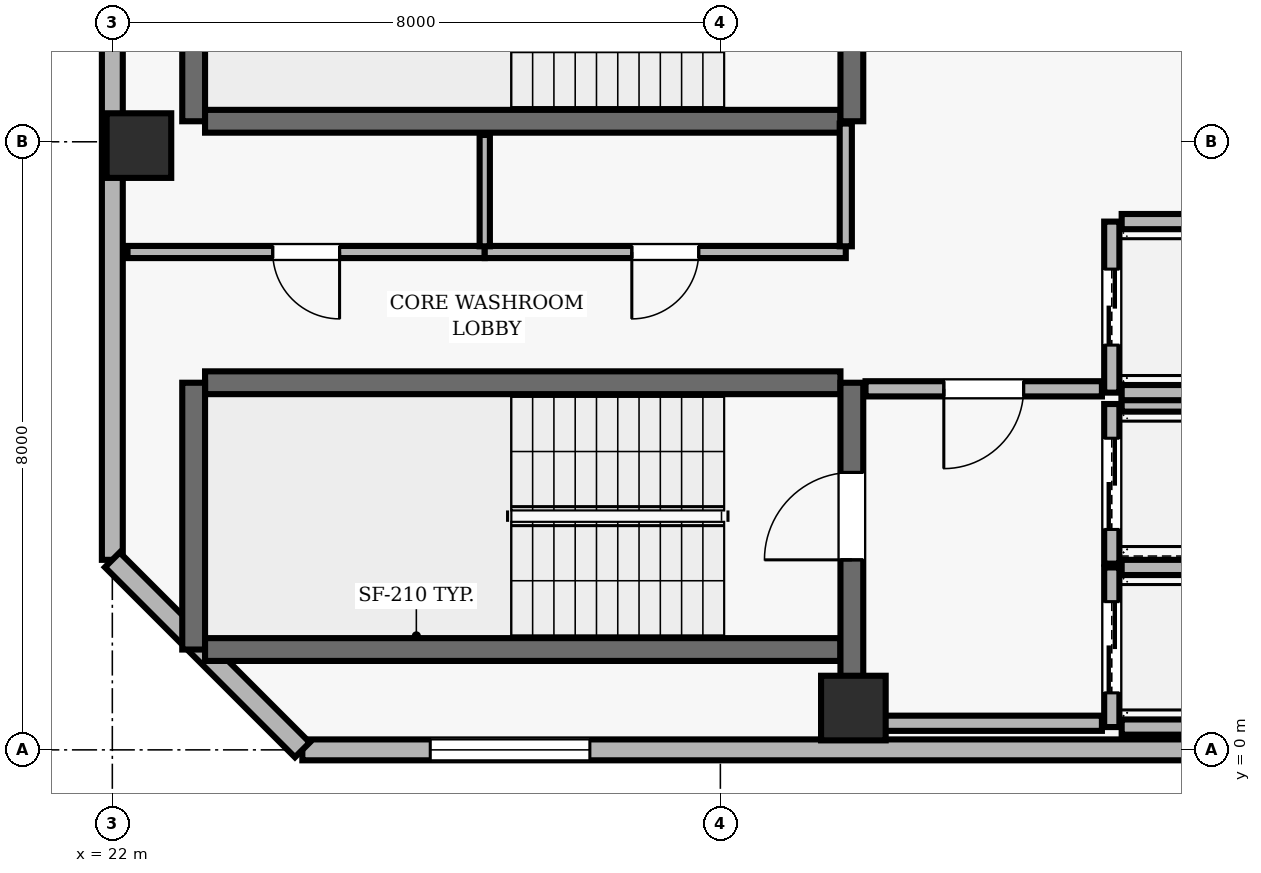
"""IFC4 building model, lengths in metres.
Left out: names, types, materials, properties, quantities, classifications, styles, units other than length and angle.
Written with IfcOpenShell. Run it as: python <this file> out.ifc"""

import sys

from ifc_helpers import new_model, si_unit, direction, frame, frame_2d, origin, origin_2d, place, context, subcontext, project, spatial, rectangle, extrude, element, fill, save


model = new_model("IFC4")
c1 = context("Model", 3, precision=1e-05, world=origin(), true_north=direction((0.0, 1.0)))
c2 = subcontext(c1, "Body", "Model", "MODEL_VIEW")
j1 = project(units=[si_unit("LENGTHUNIT", "METRE"), si_unit("PLANEANGLEUNIT", "RADIAN")], contexts=[c1])
p1 = place(None, origin())
s1 = spatial("IfcSite", under=j1, at=p1, CompositionType="ELEMENT")
p2 = place(p1, origin())
s2 = spatial("IfcBuilding", under=s1, at=p2, CompositionType="ELEMENT")
p3 = place(p2, frame((0.0, 0.0, 259.9)))
s3 = spatial("IfcBuildingStorey", under=s2, at=p3, CompositionType="ELEMENT", Elevation=259.9)
for number, where, z_axis, x_axis in (
    (1, (31.75, 0.55, 0.0), (0.0, 0.0, 1.0), (1.0, 0.0, 0.0)),
    (2, (22.35, 7.95, 0.0), (0.0, 0.0, 1.0), (1.0, 0.0, 0.0)),
):
    element("IfcColumn", number, at=place(p3, frame(where, z_axis=z_axis, x_axis=x_axis)), inside=s3, PredefinedType="COLUMN", context=c2, shape_type="SweptSolid", body=[
        extrude(rectangle(XDim=0.85, YDim=0.85, at=origin_2d()), origin(), (0.0, 0.0, 1.0), 3.9),
    ])
p4 = place(p3, frame((24.5, 0.0, 0.0), z_axis=(0.0, 0.0, 1.0), x_axis=(1.0, 0.0, 0.0)))
e3 = element("IfcWall", 3, at=p4, inside=s3, PredefinedType="SOLIDWALL", context=c2, shape_type="SweptSolid", body=[
    extrude(rectangle(XDim=32.8, YDim=0.275, at=frame_2d((16.4, 0.0))), origin(), (0.0, 0.0, 1.0), 3.69),
])
p5 = place(p4, frame((1.683, 0.0, 0.9)))
e4 = element("IfcOpeningElement", 4, at=p5, cuts=e3, PredefinedType="OPENING", context=c2, shape_type="SweptSolid", body=[
    extrude(rectangle(XDim=2.1, YDim=1.6, at=frame_2d((1.05, 0.8))), frame((0.0, 0.147, 0.0), z_axis=(0.0, -1.0, 0.0), x_axis=(1.0, 0.0, 0.0)), (0.0, 0.0, 1.0), 0.295),
])
p6 = place(p4, frame((23.55, 0.0, 0.9)))
e5 = element("IfcOpeningElement", 5, at=p6, cuts=e3, PredefinedType="OPENING", context=c2, shape_type="SweptSolid", body=[
    extrude(rectangle(XDim=2.1, YDim=1.6, at=frame_2d((1.05, 0.8))), frame((0.0, 0.147, 0.0), z_axis=(0.0, -1.0, 0.0), x_axis=(1.0, 0.0, 0.0)), (0.0, 0.0, 1.0), 0.295),
])
p7 = place(p4, frame((29.017, 0.0, 0.9)))
e6 = element("IfcOpeningElement", 6, at=p7, cuts=e3, PredefinedType="OPENING", context=c2, shape_type="SweptSolid", body=[
    extrude(rectangle(XDim=2.1, YDim=1.6, at=frame_2d((1.05, 0.8))), frame((0.0, 0.147, 0.0), z_axis=(0.0, -1.0, 0.0), x_axis=(1.0, 0.0, 0.0)), (0.0, 0.0, 1.0), 0.295),
])
p8 = place(p3, frame((22.0, 35.3, 0.0), z_axis=(0.0, 0.0, 1.0), x_axis=(0.0, -1.0, 0.0)))
e7 = element("IfcWall", 7, at=p8, inside=s3, PredefinedType="SOLIDWALL", context=c2, shape_type="SweptSolid", body=[
    extrude(rectangle(XDim=32.8, YDim=0.275, at=frame_2d((16.4, 0.0))), origin(), (0.0, 0.0, 1.0), 3.69),
])
p9 = place(p8, frame((7.3, 0.0, 0.0)))
e8 = element("IfcOpeningElement", 8, at=p9, cuts=e7, PredefinedType="OPENING", context=c2, shape_type="SweptSolid", body=[
    extrude(rectangle(XDim=1.0, YDim=2.2, at=frame_2d((0.5, 1.1))), frame((0.0, 0.147, 0.0), z_axis=(0.0, -1.0, 0.0), x_axis=(1.0, 0.0, 0.0)), (0.0, 0.0, 1.0), 0.295),
])
p10 = place(p8, frame((12.617, 0.0, 0.9)))
e9 = element("IfcOpeningElement", 9, at=p10, cuts=e7, PredefinedType="OPENING", context=c2, shape_type="SweptSolid", body=[
    extrude(rectangle(XDim=2.1, YDim=1.6, at=frame_2d((1.05, 0.8))), frame((0.0, 0.147, 0.0), z_axis=(0.0, -1.0, 0.0), x_axis=(1.0, 0.0, 0.0)), (0.0, 0.0, 1.0), 0.295),
])
p11 = place(p8, frame((17.633, 0.0, 0.9)))
e10 = element("IfcOpeningElement", 10, at=p11, cuts=e7, PredefinedType="OPENING", context=c2, shape_type="SweptSolid", body=[
    extrude(rectangle(XDim=2.1, YDim=1.6, at=frame_2d((1.05, 0.8))), frame((0.0, 0.147, 0.0), z_axis=(0.0, -1.0, 0.0), x_axis=(1.0, 0.0, 0.0)), (0.0, 0.0, 1.0), 0.295),
])
p12 = place(p8, frame((23.55, 0.0, 0.9)))
e11 = element("IfcOpeningElement", 11, at=p12, cuts=e7, PredefinedType="OPENING", context=c2, shape_type="SweptSolid", body=[
    extrude(rectangle(XDim=2.1, YDim=1.6, at=frame_2d((1.05, 0.8))), frame((0.0, 0.147, 0.0), z_axis=(0.0, -1.0, 0.0), x_axis=(1.0, 0.0, 0.0)), (0.0, 0.0, 1.0), 0.295),
])
p13 = place(p3, frame((22.0, 2.5, 0.0), z_axis=(0.0, 0.0, 1.0), x_axis=(0.707106781187, -0.707106781187, 0.0)))
e12 = element("IfcWall", 12, at=p13, inside=s3, PredefinedType="SOLIDWALL", context=c2, shape_type="SweptSolid", body=[
    extrude(rectangle(XDim=3.536, YDim=0.275, at=frame_2d((1.768, 0.0))), origin(), (0.0, 0.0, 1.0), 3.69),
])
p14 = place(p3, frame((31.58, 4.83, 0.0), z_axis=(0.0, 0.0, 1.0), x_axis=(-1.0, 0.0, 0.0)))
e13 = element("IfcWall", 13, at=p14, inside=s3, PredefinedType="SHEAR", context=c2, shape_type="SweptSolid", body=[
    extrude(rectangle(XDim=8.36, YDim=0.3, at=frame_2d((4.18, 0.0))), origin(), (0.0, 0.0, 1.0), 3.69),
])
p15 = place(p3, frame((23.07, 4.83, 0.0), z_axis=(0.0, 0.0, 1.0), x_axis=(0.0, -1.0, 0.0)))
e14 = element("IfcWall", 14, at=p15, inside=s3, PredefinedType="SHEAR", context=c2, shape_type="SweptSolid", body=[
    extrude(rectangle(XDim=3.51, YDim=0.3, at=frame_2d((1.755, 0.0))), origin(), (0.0, 0.0, 1.0), 3.69),
])
p16 = place(p3, frame((23.22, 1.32, 0.0), z_axis=(0.0, 0.0, 1.0), x_axis=(1.0, 0.0, 0.0)))
e15 = element("IfcWall", 15, at=p16, inside=s3, PredefinedType="SHEAR", context=c2, shape_type="SweptSolid", body=[
    extrude(rectangle(XDim=8.36, YDim=0.3, at=frame_2d((4.18, 0.0))), origin(), (0.0, 0.0, 1.0), 3.69),
])
p17 = place(p3, frame((31.73, 0.96, 0.0), z_axis=(0.0, 0.0, 1.0), x_axis=(0.0, 1.0, 0.0)))
e16 = element("IfcWall", 16, at=p17, inside=s3, PredefinedType="SHEAR", context=c2, shape_type="SweptSolid", body=[
    extrude(rectangle(XDim=3.87, YDim=0.3, at=frame_2d((1.935, 0.0))), origin(), (0.0, 0.0, 1.0), 3.69),
])
p18 = place(p17, frame((1.54, 0.0, 0.0)))
e17 = element("IfcOpeningElement", 17, at=p18, cuts=e16, PredefinedType="OPENING", context=c2, shape_type="SweptSolid", body=[
    extrude(rectangle(XDim=1.15, YDim=2.15, at=frame_2d((0.575, 1.075))), frame((0.0, 0.16, 0.0), z_axis=(0.0, -1.0, 0.0), x_axis=(1.0, 0.0, 0.0)), (0.0, 0.0, 1.0), 0.32),
])
p19 = place(p3, frame((23.07, 11.78, 0.0), z_axis=(0.0, 0.0, 1.0), x_axis=(0.0, -1.0, 0.0)))
e18 = element("IfcWall", 18, at=p19, inside=s3, PredefinedType="SHEAR", context=c2, shape_type="SweptSolid", body=[
    extrude(rectangle(XDim=3.51, YDim=0.3, at=frame_2d((1.755, 0.0))), origin(), (0.0, 0.0, 1.0), 3.69),
])
p20 = place(p3, frame((23.22, 8.27, 0.0), z_axis=(0.0, 0.0, 1.0), x_axis=(1.0, 0.0, 0.0)))
e19 = element("IfcWall", 19, at=p20, inside=s3, PredefinedType="SHEAR", context=c2, shape_type="SweptSolid", body=[
    extrude(rectangle(XDim=8.36, YDim=0.3, at=frame_2d((4.18, 0.0))), origin(), (0.0, 0.0, 1.0), 3.69),
])
p21 = place(p3, frame((31.73, 8.27, 0.0), z_axis=(0.0, 0.0, 1.0), x_axis=(0.0, 1.0, 0.0)))
e20 = element("IfcWall", 20, at=p21, inside=s3, PredefinedType="SHEAR", context=c2, shape_type="SweptSolid", body=[
    extrude(rectangle(XDim=3.51, YDim=0.3, at=frame_2d((1.755, 0.0))), origin(), (0.0, 0.0, 1.0), 3.69),
])
p22 = place(p21, frame((1.18, 0.0, 0.0)))
e21 = element("IfcOpeningElement", 21, at=p22, cuts=e20, PredefinedType="OPENING", context=c2, shape_type="SweptSolid", body=[
    extrude(rectangle(XDim=1.15, YDim=2.15, at=frame_2d((0.575, 1.075))), frame((0.0, 0.16, 0.0), z_axis=(0.0, -1.0, 0.0), x_axis=(1.0, 0.0, 0.0)), (0.0, 0.0, 1.0), 0.32),
])
p23 = place(p3, frame((35.15, 2.4, 0.0), z_axis=(0.0, 0.0, 1.0), x_axis=(0.0, -1.0, 0.0)))
e22 = element("IfcWall", 22, at=p23, inside=s3, PredefinedType="SOLIDWALL", context=c2, shape_type="SweptSolid", body=[
    extrude(rectangle(XDim=2.1, YDim=0.2, at=frame_2d((1.05, 0.0))), origin(), (0.0, 0.0, 1.0), 3.69),
])
p24 = place(p23, frame((0.45, 0.0, 0.0)))
e23 = element("IfcOpeningElement", 23, at=p24, cuts=e22, PredefinedType="OPENING", context=c2, shape_type="SweptSolid", body=[
    extrude(rectangle(XDim=1.2, YDim=2.15, at=frame_2d((0.6, 1.075))), frame((0.0, 0.11, 0.0), z_axis=(0.0, -1.0, 0.0), x_axis=(1.0, 0.0, 0.0)), (0.0, 0.0, 1.0), 0.22),
])
for number, where, z_axis, x_axis in (
    (24, (35.28, 0.3, 0.0), (0.0, 0.0, 1.0), (1.0, 0.0, 0.0)),
    (25, (37.42, 2.4, 0.0), (0.0, 0.0, 1.0), (-1.0, 0.0, 0.0)),
):
    element("IfcWall", number, at=place(p3, frame(where, z_axis=z_axis, x_axis=x_axis)), inside=s3, PredefinedType="SOLIDWALL", context=c2, shape_type="SweptSolid", body=[
        extrude(rectangle(XDim=2.14, YDim=0.2, at=frame_2d((1.07, 0.0))), origin(), (0.0, 0.0, 1.0), 3.69),
    ])
p25 = place(p3, frame((35.15, 4.55, 0.0), z_axis=(0.0, 0.0, 1.0), x_axis=(0.0, -1.0, 0.0)))
e26 = element("IfcWall", 26, at=p25, inside=s3, PredefinedType="SOLIDWALL", context=c2, shape_type="SweptSolid", body=[
    extrude(rectangle(XDim=2.1, YDim=0.2, at=frame_2d((1.05, 0.0))), origin(), (0.0, 0.0, 1.0), 3.69),
])
p26 = place(p25, frame((0.45, 0.0, 0.0)))
e27 = element("IfcOpeningElement", 27, at=p26, cuts=e26, PredefinedType="OPENING", context=c2, shape_type="SweptSolid", body=[
    extrude(rectangle(XDim=1.2, YDim=2.15, at=frame_2d((0.6, 1.075))), frame((0.0, 0.11, 0.0), z_axis=(0.0, -1.0, 0.0), x_axis=(1.0, 0.0, 0.0)), (0.0, 0.0, 1.0), 0.22),
])
p27 = place(p3, frame((37.42, 4.55, 0.0), z_axis=(0.0, 0.0, 1.0), x_axis=(-1.0, 0.0, 0.0)))
e28 = element("IfcWall", 28, at=p27, inside=s3, PredefinedType="SOLIDWALL", context=c2, shape_type="SweptSolid", body=[
    extrude(rectangle(XDim=2.14, YDim=0.2, at=frame_2d((1.07, 0.0))), origin(), (0.0, 0.0, 1.0), 3.69),
])
p28 = place(p3, frame((35.15, 6.95, 0.0), z_axis=(0.0, 0.0, 1.0), x_axis=(0.0, -1.0, 0.0)))
e29 = element("IfcWall", 29, at=p28, inside=s3, PredefinedType="SOLIDWALL", context=c2, shape_type="SweptSolid", body=[
    extrude(rectangle(XDim=2.25, YDim=0.2, at=frame_2d((1.125, 0.0))), origin(), (0.0, 0.0, 1.0), 3.69),
])
p29 = place(p28, frame((0.625, 0.0, 0.0)))
e30 = element("IfcOpeningElement", 30, at=p29, cuts=e29, PredefinedType="OPENING", context=c2, shape_type="SweptSolid", body=[
    extrude(rectangle(XDim=1.0, YDim=2.1, at=frame_2d((0.5, 1.05))), frame((0.0, 0.11, 0.0), z_axis=(0.0, -1.0, 0.0), x_axis=(1.0, 0.0, 0.0)), (0.0, 0.0, 1.0), 0.22),
])
for number, where, z_axis, x_axis in (
    (31, (35.28, 4.7, 0.0), (0.0, 0.0, 1.0), (1.0, 0.0, 0.0)),
    (32, (37.42, 6.95, 0.0), (0.0, 0.0, 1.0), (-1.0, 0.0, 0.0)),
):
    element("IfcWall", number, at=place(p3, frame(where, z_axis=z_axis, x_axis=x_axis)), inside=s3, PredefinedType="SOLIDWALL", context=c2, shape_type="SweptSolid", body=[
        extrude(rectangle(XDim=2.14, YDim=0.2, at=frame_2d((1.07, 0.0))), origin(), (0.0, 0.0, 1.0), 3.69),
    ])
p30 = place(p3, frame((26.9, 6.55, 0.0), z_axis=(0.0, 0.0, 1.0), x_axis=(-1.0, 0.0, 0.0)))
e33 = element("IfcWall", 33, at=p30, inside=s3, PredefinedType="PARTITIONING", context=c2, shape_type="SweptSolid", body=[
    extrude(rectangle(XDim=4.7, YDim=0.16, at=frame_2d((2.35, 0.0))), origin(), (0.0, 0.0, 1.0), 3.69),
])
p31 = place(p30, frame((1.91, 0.0, 0.0)))
e34 = element("IfcOpeningElement", 34, at=p31, cuts=e33, PredefinedType="OPENING", context=c2, shape_type="SweptSolid", body=[
    extrude(rectangle(XDim=0.88, YDim=2.1, at=frame_2d((0.44, 1.05))), frame((0.0, 0.09, 0.0), z_axis=(0.0, -1.0, 0.0), x_axis=(1.0, 0.0, 0.0)), (0.0, 0.0, 1.0), 0.18),
])
p32 = place(p3, frame((31.65, 0.35, 0.0), z_axis=(0.0, 0.0, 1.0), x_axis=(1.0, 0.0, 0.0)))
e35 = element("IfcWall", 35, at=p32, inside=s3, PredefinedType="SOLIDWALL", context=c2, shape_type="SweptSolid", body=[
    extrude(rectangle(XDim=3.37, YDim=0.2, at=frame_2d((1.685, 0.0))), origin(), (0.0, 0.0, 1.0), 3.69),
])
p33 = place(p3, frame((31.65, 6.55, 0.0), z_axis=(0.0, 0.0, 1.0), x_axis=(-1.0, 0.0, 0.0)))
e36 = element("IfcWall", 36, at=p33, inside=s3, PredefinedType="PARTITIONING", context=c2, shape_type="SweptSolid", body=[
    extrude(rectangle(XDim=4.75, YDim=0.16, at=frame_2d((2.375, 0.0))), origin(), (0.0, 0.0, 1.0), 3.69),
])
p34 = place(p33, frame((1.935, 0.0, 0.0)))
e37 = element("IfcOpeningElement", 37, at=p34, cuts=e36, PredefinedType="OPENING", context=c2, shape_type="SweptSolid", body=[
    extrude(rectangle(XDim=0.88, YDim=2.1, at=frame_2d((0.44, 1.05))), frame((0.0, 0.09, 0.0), z_axis=(0.0, -1.0, 0.0), x_axis=(1.0, 0.0, 0.0)), (0.0, 0.0, 1.0), 0.18),
])
p35 = place(p3, frame((35.02, 4.75, 0.0), z_axis=(0.0, 0.0, 1.0), x_axis=(-1.0, 0.0, 0.0)))
e38 = element("IfcWall", 38, at=p35, inside=s3, PredefinedType="SOLIDWALL", context=c2, shape_type="SweptSolid", body=[
    extrude(rectangle(XDim=3.11, YDim=0.2, at=frame_2d((1.555, 0.0))), origin(), (0.0, 0.0, 1.0), 3.69),
])
p36 = place(p35, frame((1.03, 0.0, 0.0)))
e39 = element("IfcOpeningElement", 39, at=p36, cuts=e38, PredefinedType="OPENING", context=c2, shape_type="SweptSolid", body=[
    extrude(rectangle(XDim=1.05, YDim=2.15, at=frame_2d((0.525, 1.075))), frame((0.0, 0.11, 0.0), z_axis=(0.0, -1.0, 0.0), x_axis=(1.0, 0.0, 0.0)), (0.0, 0.0, 1.0), 0.22),
])
p37 = place(p3, frame((26.9, 6.625, 0.0), z_axis=(0.0, 0.0, 1.0), x_axis=(0.0, 1.0, 0.0)))
e40 = element("IfcWall", 40, at=p37, inside=s3, PredefinedType="PARTITIONING", context=c2, shape_type="SweptSolid", body=[
    extrude(rectangle(XDim=1.465, YDim=0.135, at=frame_2d((0.732, 0.0))), origin(), (0.0, 0.0, 1.0), 3.69),
])
p38 = place(p3, frame((31.65, 8.24, 0.0), z_axis=(0.0, 0.0, 1.0), x_axis=(0.0, -1.0, 0.0)))
e41 = element("IfcWall", 41, at=p38, inside=s3, PredefinedType="PARTITIONING", context=c2, shape_type="SweptSolid", body=[
    extrude(rectangle(XDim=1.615, YDim=0.16, at=frame_2d((0.808, 0.0))), origin(), (0.0, 0.0, 1.0), 3.69),
])
p39 = place(p5, origin())
e42 = element("IfcWindow", 42, at=p39, inside=s3, PartitioningType="SINGLE_PANEL", PredefinedType="WINDOW", context=c2, shape_type="SweptSolid", body=[
    extrude(rectangle(XDim=2.1, YDim=1.6, at=frame_2d((1.05, 0.8))), frame((0.0, 0.03, 0.0), z_axis=(0.0, -1.0, 0.0), x_axis=(1.0, 0.0, 0.0)), (0.0, 0.0, 1.0), 0.06),
])
fill(e4, e42)
p40 = place(p18, origin())
e43 = element("IfcDoor", 43, at=p40, inside=s3, OperationType="SINGLE_SWING_LEFT", PredefinedType="DOOR", context=c2, shape_type="SweptSolid", body=[
    extrude(rectangle(XDim=1.15, YDim=2.15, at=frame_2d((0.575, 1.075))), frame((0.0, 0.025, 0.0), z_axis=(0.0, -1.0, 0.0), x_axis=(1.0, 0.0, 0.0)), (0.0, 0.0, 1.0), 0.05),
])
fill(e17, e43)
p41 = place(p24, origin())
e44 = element("IfcDoor", 44, at=p41, inside=s3, OperationType="DOUBLE_DOOR_SLIDING", PredefinedType="DOOR", context=c2, shape_type="SweptSolid", body=[
    extrude(rectangle(XDim=1.2, YDim=2.15, at=frame_2d((0.6, 1.075))), frame((0.0, 0.025, 0.0), z_axis=(0.0, -1.0, 0.0), x_axis=(1.0, 0.0, 0.0)), (0.0, 0.0, 1.0), 0.05),
])
fill(e23, e44)
p42 = place(p26, origin())
e45 = element("IfcDoor", 45, at=p42, inside=s3, OperationType="DOUBLE_DOOR_SLIDING", PredefinedType="DOOR", context=c2, shape_type="SweptSolid", body=[
    extrude(rectangle(XDim=1.2, YDim=2.15, at=frame_2d((0.6, 1.075))), frame((0.0, 0.025, 0.0), z_axis=(0.0, -1.0, 0.0), x_axis=(1.0, 0.0, 0.0)), (0.0, 0.0, 1.0), 0.05),
])
fill(e27, e45)
p43 = place(p29, origin())
e46 = element("IfcDoor", 46, at=p43, inside=s3, OperationType="DOUBLE_DOOR_SLIDING", PredefinedType="DOOR", context=c2, shape_type="SweptSolid", body=[
    extrude(rectangle(XDim=1.0, YDim=2.1, at=frame_2d((0.5, 1.05))), frame((0.0, 0.025, 0.0), z_axis=(0.0, -1.0, 0.0), x_axis=(1.0, 0.0, 0.0)), (0.0, 0.0, 1.0), 0.05),
])
fill(e30, e46)
p44 = place(p36, origin())
e47 = element("IfcDoor", 47, at=p44, inside=s3, OperationType="SINGLE_SWING_RIGHT", PredefinedType="DOOR", context=c2, shape_type="SweptSolid", body=[
    extrude(rectangle(XDim=1.05, YDim=2.15, at=frame_2d((0.525, 1.075))), frame((0.0, 0.025, 0.0), z_axis=(0.0, -1.0, 0.0), x_axis=(1.0, 0.0, 0.0)), (0.0, 0.0, 1.0), 0.05),
])
fill(e39, e47)
p45 = place(p31, origin())
e48 = element("IfcDoor", 48, at=p45, inside=s3, OperationType="SINGLE_SWING_LEFT", PredefinedType="DOOR", context=c2, shape_type="SweptSolid", body=[
    extrude(rectangle(XDim=0.88, YDim=2.1, at=frame_2d((0.44, 1.05))), frame((0.0, 0.025, 0.0), z_axis=(0.0, -1.0, 0.0), x_axis=(1.0, 0.0, 0.0)), (0.0, 0.0, 1.0), 0.05),
])
fill(e34, e48)
p46 = place(p34, origin())
e49 = element("IfcDoor", 49, at=p46, inside=s3, OperationType="SINGLE_SWING_RIGHT", PredefinedType="DOOR", context=c2, shape_type="SweptSolid", body=[
    extrude(rectangle(XDim=0.88, YDim=2.1, at=frame_2d((0.44, 1.05))), frame((0.0, 0.025, 0.0), z_axis=(0.0, -1.0, 0.0), x_axis=(1.0, 0.0, 0.0)), (0.0, 0.0, 1.0), 0.05),
])
fill(e37, e49)
save(model, sys.argv[1])
